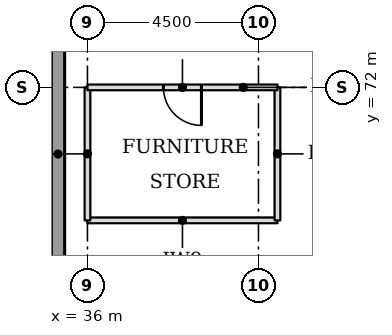
"""IFC4 building model, lengths in metres.
Left out: names, types, materials, properties, quantities, classifications, styles, units other than length and angle.
Written with IfcOpenShell. Run it as: python <this file> out.ifc"""

import sys

from ifc_helpers import new_model, si_unit, direction, frame, frame_2d, origin, place, context, subcontext, project, spatial, rectangle, extrude, element, fill, save


model = new_model("IFC4")
c1 = context("Model", 3, precision=1e-05, world=origin(), true_north=direction((0.0, 1.0)))
c2 = subcontext(c1, "Body", "Model", "MODEL_VIEW")
j1 = project(units=[si_unit("LENGTHUNIT", "METRE"), si_unit("PLANEANGLEUNIT", "RADIAN")], contexts=[c1])
p1 = place(None, origin())
s1 = spatial("IfcSite", under=j1, at=p1, CompositionType="ELEMENT")
p2 = place(p1, origin())
s2 = spatial("IfcBuilding", under=s1, at=p2, CompositionType="ELEMENT")
p3 = place(p2, frame((0.0, 0.0, 13.5)))
s3 = spatial("IfcBuildingStorey", under=s2, at=p3, CompositionType="ELEMENT", Elevation=13.5)
p4 = place(p3, frame((35.225, 76.894, 0.0), z_axis=(0.0, 0.0, 1.0), x_axis=(0.0, -1.0, 0.0)))
e1 = element("IfcWall", 1, at=p4, inside=s3, PredefinedType="STANDARD", context=c2, shape_type="SweptSolid", body=[
    extrude(rectangle(XDim=13.293, YDim=0.35, at=frame_2d((6.647, 0.0))), origin(), (0.0, 0.0, 1.0), 4.755),
])
p5 = place(p4, frame((9.493, 0.0, 0.9)))
e2 = element("IfcOpeningElement", 2, at=p5, cuts=e1, PredefinedType="OPENING", context=c2, shape_type="SweptSolid", body=[
    extrude(rectangle(XDim=3.3, YDim=3.1, at=frame_2d((1.65, 1.55))), frame((0.0, 0.185, 0.0), z_axis=(0.0, -1.0, 0.0), x_axis=(1.0, 0.0, 0.0)), (0.0, 0.0, 1.0), 0.37),
])
p6 = place(p3, frame((36.0, 68.5, 0.0), z_axis=(0.0, 0.0, 1.0), x_axis=(1.0, 0.0, 0.0)))
e3 = element("IfcWall", 3, at=p6, inside=s3, PredefinedType="PARTITIONING", context=c2, shape_type="SweptSolid", body=[
    extrude(rectangle(XDim=5.0, YDim=0.15, at=frame_2d((2.5, 0.0))), origin(), (0.0, 0.0, 1.0), 4.78),
])
p7 = place(p3, frame((36.0, 68.5, 0.0), z_axis=(0.0, 0.0, 1.0), x_axis=(0.0, 1.0, 0.0)))
e4 = element("IfcWall", 4, at=p7, inside=s3, PredefinedType="PARTITIONING", context=c2, shape_type="SweptSolid", body=[
    extrude(rectangle(XDim=3.5, YDim=0.15, at=frame_2d((1.75, 0.0))), origin(), (0.0, 0.0, 1.0), 3.78),
])
p8 = place(p3, frame((41.0, 68.5, 0.0), z_axis=(0.0, 0.0, 1.0), x_axis=(0.0, 1.0, 0.0)))
e5 = element("IfcWall", 5, at=p8, inside=s3, PredefinedType="PARTITIONING", context=c2, shape_type="SweptSolid", body=[
    extrude(rectangle(XDim=3.5, YDim=0.15, at=frame_2d((1.75, 0.0))), origin(), (0.0, 0.0, 1.0), 4.78),
])
p9 = place(p3, frame((36.0, 72.0, 0.0), z_axis=(0.0, 0.0, 1.0), x_axis=(1.0, 0.0, 0.0)))
e6 = element("IfcWall", 6, at=p9, inside=s3, PredefinedType="PARTITIONING", context=c2, shape_type="SweptSolid", body=[
    extrude(rectangle(XDim=5.0, YDim=0.15, at=frame_2d((2.5, 0.0))), origin(), (0.0, 0.0, 1.0), 4.78),
])
p10 = place(p9, frame((2.0, 0.0, 0.0)))
e7 = element("IfcOpeningElement", 7, at=p10, cuts=e6, PredefinedType="OPENING", context=c2, shape_type="SweptSolid", body=[
    extrude(rectangle(XDim=1.0, YDim=2.1, at=frame_2d((0.5, 1.05))), frame((0.0, 0.085, 0.0), z_axis=(0.0, -1.0, 0.0), x_axis=(1.0, 0.0, 0.0)), (0.0, 0.0, 1.0), 0.17),
])
p11 = place(p10, frame((1.0, 0.0, 0.0), z_axis=(0.0, 0.0, 1.0), x_axis=(-1.0, 0.0, 0.0)))
e8 = element("IfcDoor", 8, at=p11, inside=s3, OperationType="SINGLE_SWING_LEFT", PredefinedType="DOOR", context=c2, shape_type="SweptSolid", body=[
    extrude(rectangle(XDim=1.0, YDim=2.1, at=frame_2d((0.5, 1.05))), frame((0.0, 0.025, 0.0), z_axis=(0.0, -1.0, 0.0), x_axis=(1.0, 0.0, 0.0)), (0.0, 0.0, 1.0), 0.05),
])
fill(e7, e8)
save(model, sys.argv[1])
